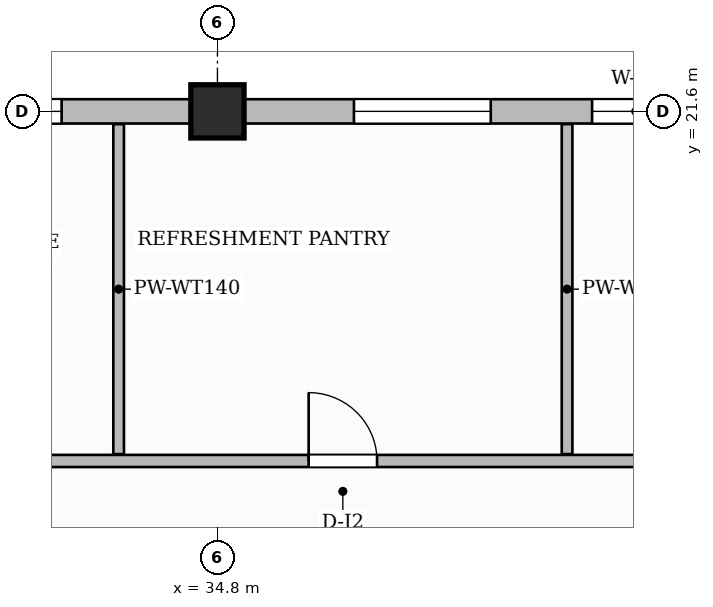
"""IFC4 building model, lengths in metres.
Left out: names, types, materials, properties, quantities, classifications, styles, units other than length and angle.
Written with IfcOpenShell. Run it as: python <this file> out.ifc"""

import sys

from ifc_helpers import new_model, si_unit, direction, frame, frame_2d, origin, origin_2d, place, context, subcontext, project, spatial, rectangle, extrude, source, transform, mapped, element, fill, save


model = new_model("IFC4")
c1 = context("Model", 3, precision=1e-05, world=origin(), true_north=direction((0.0, 1.0)))
c2 = subcontext(c1, "Body", "Model", "MODEL_VIEW")
j1 = project(units=[si_unit("LENGTHUNIT", "METRE"), si_unit("PLANEANGLEUNIT", "RADIAN")], contexts=[c1])
p1 = place(None, origin())
s1 = spatial("IfcSite", under=j1, at=p1, CompositionType="ELEMENT")
p2 = place(p1, origin())
s2 = spatial("IfcBuilding", under=s1, at=p2, CompositionType="ELEMENT")
p3 = place(p2, frame((0.0, 0.0, 286.6)))
s3 = spatial("IfcBuildingStorey", under=s2, at=p3, CompositionType="ELEMENT", Elevation=286.6)
m1 = source(origin(), c2, "Body", "SweptSolid", [
    extrude(rectangle(XDim=0.7, YDim=0.7, at=origin_2d()), origin(), (0.0, 0.0, 1.0), 3.85),
])
p4 = place(p3, frame((34.8, 21.6, 0.0), z_axis=(0.0, 0.0, 1.0), x_axis=(1.0, 0.0, 0.0)))
e1 = element("IfcColumn", 1, at=p4, inside=s3, PredefinedType="COLUMN", context=c2, shape_type="MappedRepresentation", body=[
    mapped(m1, transform((0.0, 0.0, 0.0), scale=1.0)),
])
p5 = place(p3, frame((30.29, 17.0, 0.0), z_axis=(0.0, 0.0, 1.0), x_axis=(1.0, 0.0, 0.0)))
e2 = element("IfcWall", 2, at=p5, inside=s3, PredefinedType="PARTITIONING", context=c2, shape_type="SweptSolid", body=[
    extrude(rectangle(XDim=19.37, YDim=0.16, at=frame_2d((9.685, 0.0))), origin(), (0.0, 0.0, 1.0), 3.6),
])
p6 = place(p5, frame((1.135, 0.0, 0.0)))
e3 = element("IfcOpeningElement", 3, at=p6, cuts=e2, PredefinedType="OPENING", context=c2, shape_type="SweptSolid", body=[
    extrude(rectangle(XDim=0.85, YDim=2.1, at=frame_2d((0.425, 1.05))), frame((0.0, 0.09, 0.0), z_axis=(0.0, -1.0, 0.0), x_axis=(1.0, 0.0, 0.0)), (0.0, 0.0, 1.0), 0.18),
])
p7 = place(p5, frame((5.71, 0.0, 0.0)))
e4 = element("IfcOpeningElement", 4, at=p7, cuts=e2, PredefinedType="OPENING", context=c2, shape_type="SweptSolid", body=[
    extrude(rectangle(XDim=0.9, YDim=2.15, at=frame_2d((0.45, 1.075))), frame((0.0, 0.09, 0.0), z_axis=(0.0, -1.0, 0.0), x_axis=(1.0, 0.0, 0.0)), (0.0, 0.0, 1.0), 0.18),
])
p8 = place(p5, frame((10.635, 0.0, 0.0)))
e5 = element("IfcOpeningElement", 5, at=p8, cuts=e2, PredefinedType="OPENING", context=c2, shape_type="SweptSolid", body=[
    extrude(rectangle(XDim=0.95, YDim=2.15, at=frame_2d((0.475, 1.075))), frame((0.0, 0.09, 0.0), z_axis=(0.0, -1.0, 0.0), x_axis=(1.0, 0.0, 0.0)), (0.0, 0.0, 1.0), 0.18),
])
p9 = place(p5, frame((16.235, 0.0, 0.0)))
e6 = element("IfcOpeningElement", 6, at=p9, cuts=e2, PredefinedType="OPENING", context=c2, shape_type="SweptSolid", body=[
    extrude(rectangle(XDim=0.95, YDim=2.15, at=frame_2d((0.475, 1.075))), frame((0.0, 0.09, 0.0), z_axis=(0.0, -1.0, 0.0), x_axis=(1.0, 0.0, 0.0)), (0.0, 0.0, 1.0), 0.18),
])
for number, where, z_axis, x_axis in (
    (7, (33.5, 17.09, 0.0), (0.0, 0.0, 1.0), (0.0, 1.0, 0.0)),
    (8, (39.4, 17.09, 0.0), (0.0, 0.0, 1.0), (0.0, 1.0, 0.0)),
):
    element("IfcWall", number, at=place(p3, frame(where, z_axis=z_axis, x_axis=x_axis)), inside=s3, PredefinedType="PARTITIONING", context=c2, shape_type="SweptSolid", body=[
        extrude(rectangle(XDim=4.342, YDim=0.14, at=frame_2d((2.171, 0.0))), origin(), (0.0, 0.0, 1.0), 3.6),
    ])
p10 = place(p3, frame((18.0, 21.6, 0.0), z_axis=(0.0, 0.0, 1.0), x_axis=(1.0, 0.0, 0.0)))
e9 = element("IfcWall", 9, at=p10, inside=s3, PredefinedType="SOLIDWALL", context=c2, shape_type="SweptSolid", body=[
    extrude(rectangle(XDim=31.8, YDim=0.32, at=frame_2d((15.9, 0.0))), origin(), (0.0, 0.0, 1.0), 3.185),
])
p11 = place(p10, frame((0.42, 0.0, 0.0)))
e10 = element("IfcOpeningElement", 10, at=p11, cuts=e9, PredefinedType="OPENING", context=c2, shape_type="SweptSolid", body=[
    extrude(rectangle(XDim=1.2, YDim=2.2, at=frame_2d((0.6, 1.1))), frame((0.0, 0.17, 0.0), z_axis=(0.0, -1.0, 0.0), x_axis=(1.0, 0.0, 0.0)), (0.0, 0.0, 1.0), 0.34),
])
p12 = place(p10, frame((4.581, 0.0, 0.8)))
e11 = element("IfcOpeningElement", 11, at=p12, cuts=e9, PredefinedType="OPENING", context=c2, shape_type="SweptSolid", body=[
    extrude(rectangle(XDim=0.95, YDim=1.75, at=frame_2d((0.475, 0.875))), frame((0.0, 0.17, 0.0), z_axis=(0.0, -1.0, 0.0), x_axis=(1.0, 0.0, 0.0)), (0.0, 0.0, 1.0), 0.34),
])
p13 = place(p10, frame((6.964, 0.0, 0.8)))
e12 = element("IfcOpeningElement", 12, at=p13, cuts=e9, PredefinedType="OPENING", context=c2, shape_type="SweptSolid", body=[
    extrude(rectangle(XDim=1.8, YDim=1.85, at=frame_2d((0.9, 0.925))), frame((0.0, 0.17, 0.0), z_axis=(0.0, -1.0, 0.0), x_axis=(1.0, 0.0, 0.0)), (0.0, 0.0, 1.0), 0.34),
])
p14 = place(p10, frame((12.95, 0.0, 0.8)))
e13 = element("IfcOpeningElement", 13, at=p14, cuts=e9, PredefinedType="OPENING", context=c2, shape_type="SweptSolid", body=[
    extrude(rectangle(XDim=1.8, YDim=1.85, at=frame_2d((0.9, 0.925))), frame((0.0, 0.17, 0.0), z_axis=(0.0, -1.0, 0.0), x_axis=(1.0, 0.0, 0.0)), (0.0, 0.0, 1.0), 0.34),
])
p15 = place(p10, frame((18.596, 0.0, 0.8)))
e14 = element("IfcOpeningElement", 14, at=p15, cuts=e9, PredefinedType="OPENING", context=c2, shape_type="SweptSolid", body=[
    extrude(rectangle(XDim=1.8, YDim=1.85, at=frame_2d((0.9, 0.925))), frame((0.0, 0.17, 0.0), z_axis=(0.0, -1.0, 0.0), x_axis=(1.0, 0.0, 0.0)), (0.0, 0.0, 1.0), 0.34),
])
p16 = place(p10, frame((21.729, 0.0, 0.8)))
e15 = element("IfcOpeningElement", 15, at=p16, cuts=e9, PredefinedType="OPENING", context=c2, shape_type="SweptSolid", body=[
    extrude(rectangle(XDim=1.15, YDim=1.8, at=frame_2d((0.575, 0.9))), frame((0.0, 0.17, 0.0), z_axis=(0.0, -1.0, 0.0), x_axis=(1.0, 0.0, 0.0)), (0.0, 0.0, 1.0), 0.34),
])
p17 = place(p10, frame((25.121, 0.0, 0.8)))
e16 = element("IfcOpeningElement", 16, at=p17, cuts=e9, PredefinedType="OPENING", context=c2, shape_type="SweptSolid", body=[
    extrude(rectangle(XDim=0.95, YDim=1.75, at=frame_2d((0.475, 0.875))), frame((0.0, 0.17, 0.0), z_axis=(0.0, -1.0, 0.0), x_axis=(1.0, 0.0, 0.0)), (0.0, 0.0, 1.0), 0.34),
])
p18 = place(p10, frame((27.804, 0.0, 0.8)))
e17 = element("IfcOpeningElement", 17, at=p18, cuts=e9, PredefinedType="OPENING", context=c2, shape_type="SweptSolid", body=[
    extrude(rectangle(XDim=1.8, YDim=1.85, at=frame_2d((0.9, 0.925))), frame((0.0, 0.17, 0.0), z_axis=(0.0, -1.0, 0.0), x_axis=(1.0, 0.0, 0.0)), (0.0, 0.0, 1.0), 0.34),
])
m2 = source(origin(), c2, "Body", "SweptSolid", [
    extrude(rectangle(XDim=0.9, YDim=2.15, at=frame_2d((0.45, 1.075))), frame((0.0, 0.025, 0.0), z_axis=(0.0, -1.0, 0.0), x_axis=(1.0, 0.0, 0.0)), (0.0, 0.0, 1.0), 0.05),
])
p19 = place(p7, origin())
e18 = element("IfcDoor", 18, at=p19, inside=s3, OperationType="SINGLE_SWING_LEFT", PredefinedType="DOOR", context=c2, shape_type="MappedRepresentation", body=[
    mapped(m2, transform((0.0, 0.0, 0.0), scale=1.0)),
])
fill(e4, e18)
m3 = source(origin(), c2, "Body", "SweptSolid", [
    extrude(rectangle(XDim=1.8, YDim=1.85, at=frame_2d((0.9, 0.925))), frame((0.0, 0.03, 0.0), z_axis=(0.0, -1.0, 0.0), x_axis=(1.0, 0.0, 0.0)), (0.0, 0.0, 1.0), 0.06),
])
p20 = place(p14, origin())
e19 = element("IfcWindow", 19, at=p20, inside=s3, PartitioningType="DOUBLE_PANEL_VERTICAL", PredefinedType="WINDOW", context=c2, shape_type="MappedRepresentation", body=[
    mapped(m3, transform((0.0, 0.0, 0.0), scale=1.0)),
])
fill(e13, e19)
p21 = place(p15, origin())
e20 = element("IfcWindow", 20, at=p21, inside=s3, PartitioningType="DOUBLE_PANEL_VERTICAL", PredefinedType="WINDOW", context=c2, shape_type="MappedRepresentation", body=[
    mapped(m3, transform((0.0, 0.0, 0.0), scale=1.0)),
])
fill(e14, e20)
m4 = source(origin(), c2, "Body", "SweptSolid", [
    extrude(rectangle(XDim=1.15, YDim=1.8, at=frame_2d((0.575, 0.9))), frame((0.0, 0.03, 0.0), z_axis=(0.0, -1.0, 0.0), x_axis=(1.0, 0.0, 0.0)), (0.0, 0.0, 1.0), 0.06),
])
p22 = place(p16, origin())
e21 = element("IfcWindow", 21, at=p22, inside=s3, PartitioningType="SINGLE_PANEL", PredefinedType="WINDOW", context=c2, shape_type="MappedRepresentation", body=[
    mapped(m4, transform((0.0, 0.0, 0.0), scale=1.0)),
])
fill(e15, e21)
save(model, sys.argv[1])
